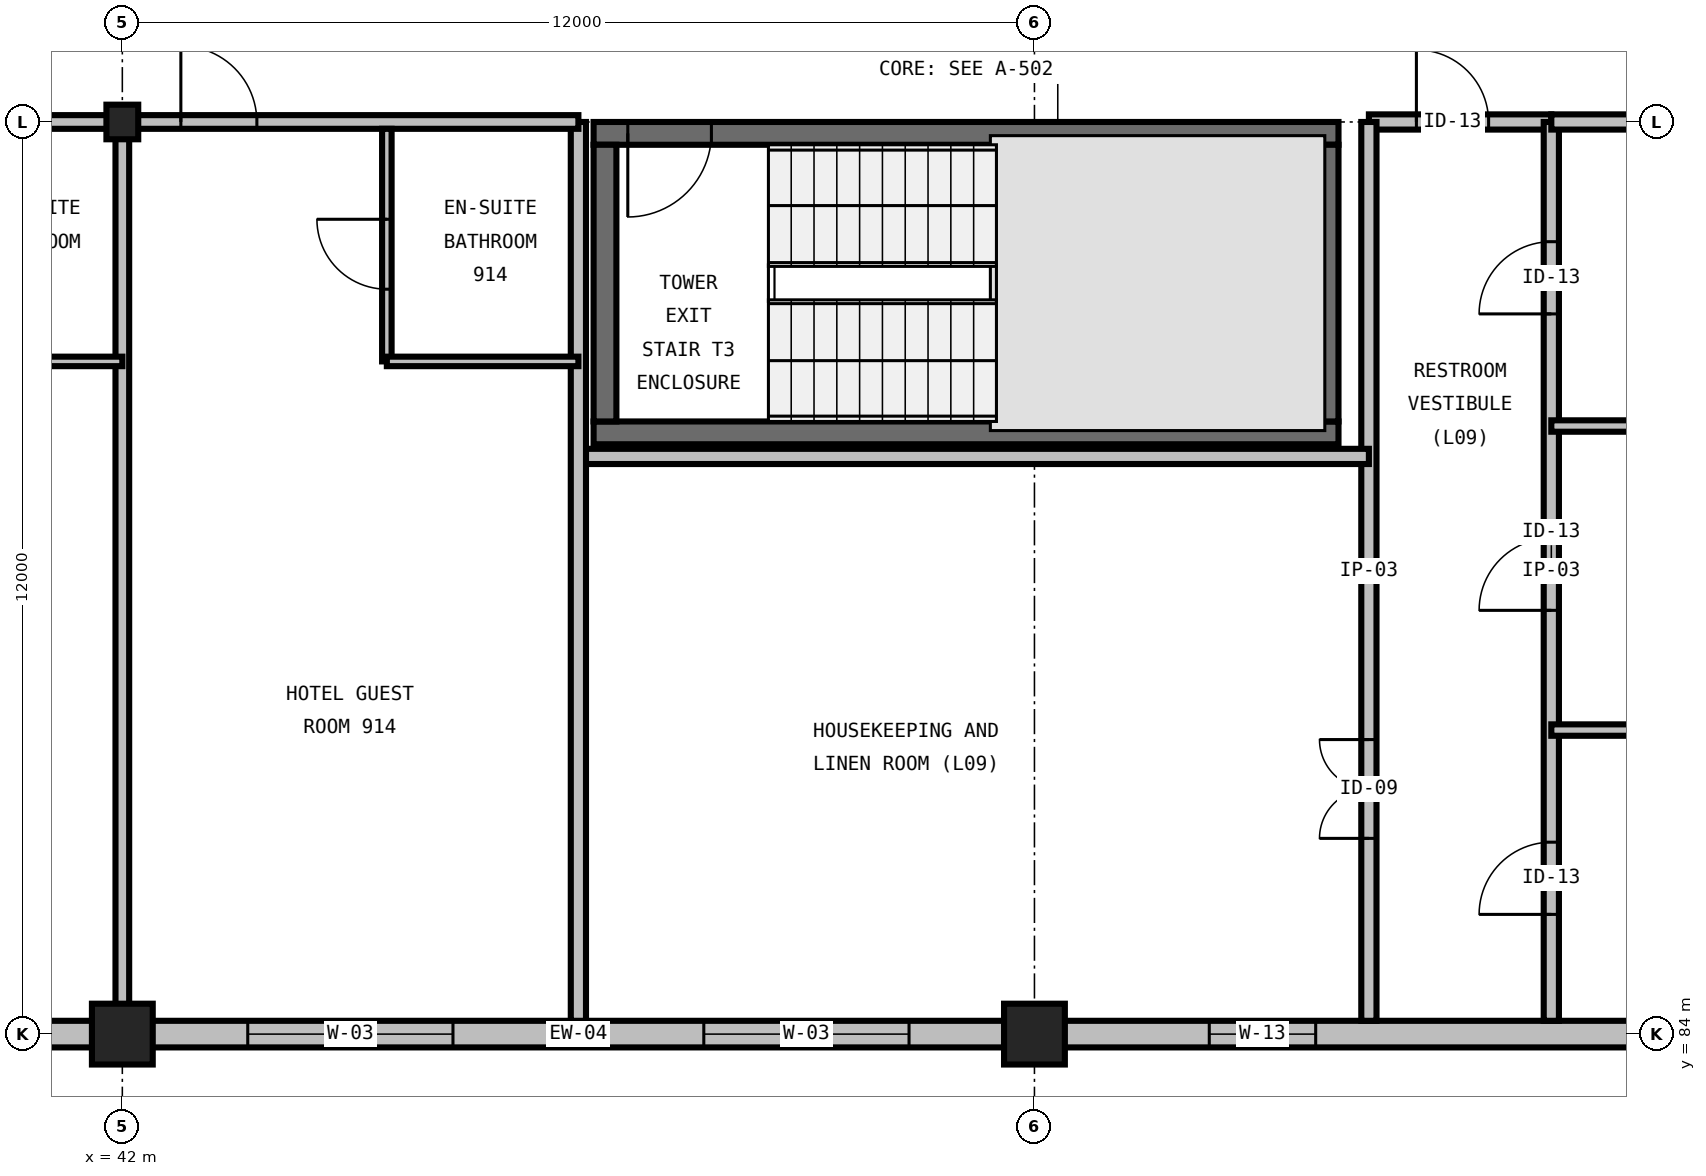
"""IFC4 building model, lengths in metres.
Left out: names, types, materials, properties, quantities, classifications, styles, units other than length and angle.
Written with IfcOpenShell. Run it as: python <this file> out.ifc"""

import sys

from ifc_helpers import new_model, si_unit, direction, frame, frame_2d, origin, origin_2d, place, context, subcontext, project, spatial, rectangle, i_section, extrude, element, fill, save


model = new_model("IFC4")
c1 = context("Model", 3, precision=1e-05, world=origin(), true_north=direction((0.0, 1.0)))
c2 = subcontext(c1, "Body", "Model", "MODEL_VIEW")
j1 = project(units=[si_unit("LENGTHUNIT", "METRE"), si_unit("PLANEANGLEUNIT", "RADIAN")], contexts=[c1])
p1 = place(None, origin())
s1 = spatial("IfcSite", under=j1, at=p1, CompositionType="ELEMENT")
p2 = place(p1, origin())
s2 = spatial("IfcBuilding", under=s1, at=p2, CompositionType="ELEMENT")
p3 = place(p2, frame((0.0, 0.0, 42.0)))
s3 = spatial("IfcBuildingStorey", under=s2, at=p3, CompositionType="ELEMENT", Elevation=42.0)
p4 = place(p3, frame((42.0, 84.0, 0.0), z_axis=(0.0, 0.0, 1.0), x_axis=(1.0, 0.0, 0.0)))
e1 = element("IfcColumn", 1, at=p4, inside=s3, PredefinedType="COLUMN", context=c2, shape_type="SweptSolid", body=[
    extrude(rectangle(XDim=0.8, YDim=0.8, at=origin_2d()), origin(), (0.0, 0.0, 1.0), 3.6),
])
p5 = place(p3, frame((42.0, 96.0, 0.0), z_axis=(0.0, 0.0, 1.0), x_axis=(1.0, 0.0, 0.0)))
e2 = element("IfcColumn", 2, at=p5, inside=s3, PredefinedType="COLUMN", context=c2, shape_type="SweptSolid", body=[
    extrude(i_section(OverallWidth=0.419, OverallDepth=0.455, WebThickness=0.042, FlangeThickness=0.068, FilletRadius=0.031, at=origin_2d()), origin(), (0.0, 0.0, 1.0), 3.6),
])
p6 = place(p3, frame((54.0, 84.0, 0.0), z_axis=(0.0, 0.0, 1.0), x_axis=(1.0, 0.0, 0.0)))
e3 = element("IfcColumn", 3, at=p6, inside=s3, PredefinedType="COLUMN", context=c2, shape_type="SweptSolid", body=[
    extrude(rectangle(XDim=0.8, YDim=0.8, at=origin_2d()), origin(), (0.0, 0.0, 1.0), 3.6),
])
p7 = place(p3, frame((48.2, 91.91, 0.0), z_axis=(0.0, 0.0, 1.0), x_axis=(1.0, 0.0, 0.0)))
e4 = element("IfcWall", 4, at=p7, inside=s3, PredefinedType="SHEAR", context=c2, shape_type="SweptSolid", body=[
    extrude(rectangle(XDim=9.8, YDim=0.3, at=frame_2d((4.9, 0.0))), origin(), (0.0, 0.0, 1.0), 3.6),
])
p8 = place(p3, frame((58.0, 95.85, 0.0), z_axis=(0.0, 0.0, 1.0), x_axis=(-1.0, 0.0, 0.0)))
e5 = element("IfcWall", 5, at=p8, inside=s3, PredefinedType="SHEAR", context=c2, shape_type="SweptSolid", body=[
    extrude(rectangle(XDim=9.8, YDim=0.3, at=frame_2d((4.9, 0.0))), origin(), (0.0, 0.0, 1.0), 3.6),
])
p9 = place(p8, frame((8.25, 0.0, 0.0)))
e6 = element("IfcOpeningElement", 6, at=p9, cuts=e5, PredefinedType="OPENING", context=c2, shape_type="SweptSolid", body=[
    extrude(rectangle(XDim=1.1, YDim=2.2, at=frame_2d((0.55, 1.1))), frame((0.0, 0.165, 0.0), z_axis=(0.0, -1.0, 0.0), x_axis=(1.0, 0.0, 0.0)), (0.0, 0.0, 1.0), 0.33),
])
for number, where, z_axis, x_axis in (
    (7, (48.35, 95.7, 0.0), (0.0, 0.0, 1.0), (0.0, -1.0, 0.0)),
    (8, (57.85, 92.06, 0.0), (0.0, 0.0, 1.0), (0.0, 1.0, 0.0)),
):
    element("IfcWall", number, at=place(p3, frame(where, z_axis=z_axis, x_axis=x_axis)), inside=s3, PredefinedType="SHEAR", context=c2, shape_type="SweptSolid", body=[
        extrude(rectangle(XDim=3.64, YDim=0.3, at=frame_2d((1.82, 0.0))), origin(), (0.0, 0.0, 1.0), 3.6),
    ])
p10 = place(p3, frame((36.0, 84.0, 0.0), z_axis=(0.0, 0.0, 1.0), x_axis=(1.0, 0.0, 0.0)))
e9 = element("IfcWall", 9, at=p10, inside=s3, PredefinedType="STANDARD", context=c2, shape_type="SweptSolid", body=[
    extrude(rectangle(XDim=6.0, YDim=0.35, at=frame_2d((3.0, 0.0))), origin(), (0.0, 0.0, 1.0), 2.486),
])
p11 = place(p10, frame((1.65, 0.0, 0.72)))
e10 = element("IfcOpeningElement", 10, at=p11, cuts=e9, PredefinedType="OPENING", context=c2, shape_type="SweptSolid", body=[
    extrude(rectangle(XDim=2.7, YDim=1.65, at=frame_2d((1.35, 0.825))), frame((0.0, 0.19, 0.0), z_axis=(0.0, -1.0, 0.0), x_axis=(1.0, 0.0, 0.0)), (0.0, 0.0, 1.0), 0.38),
])
p12 = place(p3, frame((42.0, 84.0, 0.0), z_axis=(0.0, 0.0, 1.0), x_axis=(1.0, 0.0, 0.0)))
e11 = element("IfcWall", 11, at=p12, inside=s3, PredefinedType="STANDARD", context=c2, shape_type="SweptSolid", body=[
    extrude(rectangle(XDim=12.0, YDim=0.35, at=frame_2d((6.0, 0.0))), origin(), (0.0, 0.0, 1.0), 2.486),
])
p13 = place(p12, frame((1.65, 0.0, 0.72)))
e12 = element("IfcOpeningElement", 12, at=p13, cuts=e11, PredefinedType="OPENING", context=c2, shape_type="SweptSolid", body=[
    extrude(rectangle(XDim=2.7, YDim=1.65, at=frame_2d((1.35, 0.825))), frame((0.0, 0.19, 0.0), z_axis=(0.0, -1.0, 0.0), x_axis=(1.0, 0.0, 0.0)), (0.0, 0.0, 1.0), 0.38),
])
p14 = place(p12, frame((7.65, 0.0, 0.72)))
e13 = element("IfcOpeningElement", 13, at=p14, cuts=e11, PredefinedType="OPENING", context=c2, shape_type="SweptSolid", body=[
    extrude(rectangle(XDim=2.7, YDim=1.65, at=frame_2d((1.35, 0.825))), frame((0.0, 0.19, 0.0), z_axis=(0.0, -1.0, 0.0), x_axis=(1.0, 0.0, 0.0)), (0.0, 0.0, 1.0), 0.38),
])
p15 = place(p3, frame((54.0, 84.0, 0.0), z_axis=(0.0, 0.0, 1.0), x_axis=(1.0, 0.0, 0.0)))
e14 = element("IfcWall", 14, at=p15, inside=s3, PredefinedType="STANDARD", context=c2, shape_type="SweptSolid", body=[
    extrude(rectangle(XDim=12.0, YDim=0.35, at=frame_2d((6.0, 0.0))), origin(), (0.0, 0.0, 1.0), 2.486),
])
p16 = place(p15, frame((2.3, 0.0, 1.0)))
e15 = element("IfcOpeningElement", 15, at=p16, cuts=e14, PredefinedType="OPENING", context=c2, shape_type="SweptSolid", body=[
    extrude(rectangle(XDim=1.4, YDim=1.4, at=frame_2d((0.7, 0.7))), frame((0.0, 0.19, 0.0), z_axis=(0.0, -1.0, 0.0), x_axis=(1.0, 0.0, 0.0)), (0.0, 0.0, 1.0), 0.38),
])
p17 = place(p15, frame((8.25, 0.0, 1.0)))
e16 = element("IfcOpeningElement", 16, at=p17, cuts=e14, PredefinedType="OPENING", context=c2, shape_type="SweptSolid", body=[
    extrude(rectangle(XDim=1.5, YDim=1.35, at=frame_2d((0.75, 0.675))), frame((0.0, 0.19, 0.0), z_axis=(0.0, -1.0, 0.0), x_axis=(1.0, 0.0, 0.0)), (0.0, 0.0, 1.0), 0.38),
])
p18 = place(p3, frame((58.4, 96.0, 0.0), z_axis=(0.0, 0.0, 1.0), x_axis=(1.0, 0.0, 0.0)))
e17 = element("IfcWall", 17, at=p18, inside=s3, PredefinedType="PARTITIONING", context=c2, shape_type="SweptSolid", body=[
    extrude(rectangle(XDim=2.4, YDim=0.2, at=frame_2d((1.2, 0.0))), origin(), (0.0, 0.0, 1.0), 2.359),
])
p19 = place(p18, frame((0.625, 0.0, 0.0)))
e18 = element("IfcOpeningElement", 18, at=p19, cuts=e17, PredefinedType="OPENING", context=c2, shape_type="SweptSolid", body=[
    extrude(rectangle(XDim=0.95, YDim=2.15, at=frame_2d((0.475, 1.075))), frame((0.0, 0.115, 0.0), z_axis=(0.0, -1.0, 0.0), x_axis=(1.0, 0.0, 0.0)), (0.0, 0.0, 1.0), 0.23),
])
p20 = place(p3, frame((58.4, 84.175, 0.0), z_axis=(0.0, 0.0, 1.0), x_axis=(0.0, 1.0, 0.0)))
e19 = element("IfcWall", 19, at=p20, inside=s3, PredefinedType="PARTITIONING", context=c2, shape_type="SweptSolid", body=[
    extrude(rectangle(XDim=11.825, YDim=0.2, at=frame_2d((5.913, 0.0))), origin(), (0.0, 0.0, 1.0), 3.29),
])
p21 = place(p20, frame((2.4, 0.0, 0.0)))
e20 = element("IfcOpeningElement", 20, at=p21, cuts=e19, PredefinedType="OPENING", context=c2, shape_type="SweptSolid", body=[
    extrude(rectangle(XDim=1.3, YDim=2.2, at=frame_2d((0.65, 1.1))), frame((0.0, 0.115, 0.0), z_axis=(0.0, -1.0, 0.0), x_axis=(1.0, 0.0, 0.0)), (0.0, 0.0, 1.0), 0.23),
])
p22 = place(p3, frame((60.8, 84.175, 0.0), z_axis=(0.0, 0.0, 1.0), x_axis=(0.0, 1.0, 0.0)))
e21 = element("IfcWall", 21, at=p22, inside=s3, PredefinedType="PARTITIONING", context=c2, shape_type="SweptSolid", body=[
    extrude(rectangle(XDim=11.825, YDim=0.2, at=frame_2d((5.913, 0.0))), origin(), (0.0, 0.0, 1.0), 3.29),
])
p23 = place(p22, frame((1.4, 0.0, 0.0)))
e22 = element("IfcOpeningElement", 22, at=p23, cuts=e21, PredefinedType="OPENING", context=c2, shape_type="SweptSolid", body=[
    extrude(rectangle(XDim=0.95, YDim=2.15, at=frame_2d((0.475, 1.075))), frame((0.0, 0.115, 0.0), z_axis=(0.0, -1.0, 0.0), x_axis=(1.0, 0.0, 0.0)), (0.0, 0.0, 1.0), 0.23),
])
p24 = place(p22, frame((5.4, 0.0, 0.0)))
e23 = element("IfcOpeningElement", 23, at=p24, cuts=e21, PredefinedType="OPENING", context=c2, shape_type="SweptSolid", body=[
    extrude(rectangle(XDim=0.95, YDim=2.15, at=frame_2d((0.475, 1.075))), frame((0.0, 0.115, 0.0), z_axis=(0.0, -1.0, 0.0), x_axis=(1.0, 0.0, 0.0)), (0.0, 0.0, 1.0), 0.23),
])
p25 = place(p22, frame((9.3, 0.0, 0.0)))
e24 = element("IfcOpeningElement", 24, at=p25, cuts=e21, PredefinedType="OPENING", context=c2, shape_type="SweptSolid", body=[
    extrude(rectangle(XDim=0.95, YDim=2.15, at=frame_2d((0.475, 1.075))), frame((0.0, 0.115, 0.0), z_axis=(0.0, -1.0, 0.0), x_axis=(1.0, 0.0, 0.0)), (0.0, 0.0, 1.0), 0.23),
])
p26 = place(p3, frame((60.8, 96.0, 0.0), z_axis=(0.0, 0.0, 1.0), x_axis=(1.0, 0.0, 0.0)))
e25 = element("IfcWall", 25, at=p26, inside=s3, PredefinedType="PARTITIONING", context=c2, shape_type="SweptSolid", body=[
    extrude(rectangle(XDim=5.2, YDim=0.2, at=frame_2d((2.6, 0.0))), origin(), (0.0, 0.0, 1.0), 2.359),
])
for number, where, z_axis, x_axis in (
    (26, (60.8, 88.0, 0.0), (0.0, 0.0, 1.0), (1.0, 0.0, 0.0)),
    (27, (60.8, 92.0, 0.0), (0.0, 0.0, 1.0), (1.0, 0.0, 0.0)),
):
    element("IfcWall", number, at=place(p3, frame(where, z_axis=z_axis, x_axis=x_axis)), inside=s3, PredefinedType="PARTITIONING", context=c2, shape_type="SweptSolid", body=[
        extrude(rectangle(XDim=5.2, YDim=0.15, at=frame_2d((2.6, 0.0))), origin(), (0.0, 0.0, 1.0), 3.29),
    ])
p27 = place(p3, frame((48.0, 91.6, 0.0), z_axis=(0.0, 0.0, 1.0), x_axis=(1.0, 0.0, 0.0)))
e28 = element("IfcWall", 28, at=p27, inside=s3, PredefinedType="PARTITIONING", context=c2, shape_type="SweptSolid", body=[
    extrude(rectangle(XDim=10.4, YDim=0.2, at=frame_2d((5.2, 0.0))), origin(), (0.0, 0.0, 1.0), 3.29),
])
p28 = place(p3, frame((48.0, 84.175, 0.0), z_axis=(0.0, 0.0, 1.0), x_axis=(0.0, 1.0, 0.0)))
e29 = element("IfcWall", 29, at=p28, inside=s3, PredefinedType="PARTITIONING", context=c2, shape_type="SweptSolid", body=[
    extrude(rectangle(XDim=11.825, YDim=0.2, at=frame_2d((5.913, 0.0))), origin(), (0.0, 0.0, 1.0), 3.29),
])
p29 = place(p3, frame((36.0, 96.0, 0.0), z_axis=(0.0, 0.0, 1.0), x_axis=(1.0, 0.0, 0.0)))
e30 = element("IfcWall", 30, at=p29, inside=s3, PredefinedType="PARTITIONING", context=c2, shape_type="SweptSolid", body=[
    extrude(rectangle(XDim=6.0, YDim=0.18, at=frame_2d((3.0, 0.0))), origin(), (0.0, 0.0, 1.0), 2.736),
])
p30 = place(p29, frame((0.77, 0.0, 0.0)))
e31 = element("IfcOpeningElement", 31, at=p30, cuts=e30, PredefinedType="OPENING", context=c2, shape_type="SweptSolid", body=[
    extrude(rectangle(XDim=1.0, YDim=2.15, at=frame_2d((0.5, 1.075))), frame((0.0, 0.105, 0.0), z_axis=(0.0, -1.0, 0.0), x_axis=(1.0, 0.0, 0.0)), (0.0, 0.0, 1.0), 0.21),
])
p31 = place(p3, frame((42.0, 84.175, 0.0), z_axis=(0.0, 0.0, 1.0), x_axis=(0.0, 1.0, 0.0)))
e32 = element("IfcWall", 32, at=p31, inside=s3, PredefinedType="PARTITIONING", context=c2, shape_type="SweptSolid", body=[
    extrude(rectangle(XDim=11.825, YDim=0.18, at=frame_2d((5.913, 0.0))), origin(), (0.0, 0.0, 1.0), 2.59),
])
p32 = place(p3, frame((39.48, 92.85, 0.0), z_axis=(0.0, 0.0, 1.0), x_axis=(1.0, 0.0, 0.0)))
e33 = element("IfcWall", 33, at=p32, inside=s3, PredefinedType="PARTITIONING", context=c2, shape_type="SweptSolid", body=[
    extrude(rectangle(XDim=2.52, YDim=0.125, at=frame_2d((1.26, 0.0))), origin(), (0.0, 0.0, 1.0), 3.29),
])
p33 = place(p3, frame((42.0, 96.0, 0.0), z_axis=(0.0, 0.0, 1.0), x_axis=(1.0, 0.0, 0.0)))
e34 = element("IfcWall", 34, at=p33, inside=s3, PredefinedType="PARTITIONING", context=c2, shape_type="SweptSolid", body=[
    extrude(rectangle(XDim=6.0, YDim=0.18, at=frame_2d((3.0, 0.0))), origin(), (0.0, 0.0, 1.0), 2.359),
])
p34 = place(p33, frame((0.77, 0.0, 0.0)))
e35 = element("IfcOpeningElement", 35, at=p34, cuts=e34, PredefinedType="OPENING", context=c2, shape_type="SweptSolid", body=[
    extrude(rectangle(XDim=1.0, YDim=2.15, at=frame_2d((0.5, 1.075))), frame((0.0, 0.105, 0.0), z_axis=(0.0, -1.0, 0.0), x_axis=(1.0, 0.0, 0.0)), (0.0, 0.0, 1.0), 0.21),
])
p35 = place(p3, frame((45.48, 92.85, 0.0), z_axis=(0.0, 0.0, 1.0), x_axis=(0.0, 1.0, 0.0)))
e36 = element("IfcWall", 36, at=p35, inside=s3, PredefinedType="PARTITIONING", context=c2, shape_type="SweptSolid", body=[
    extrude(rectangle(XDim=3.06, YDim=0.125, at=frame_2d((1.53, 0.0))), origin(), (0.0, 0.0, 1.0), 3.29),
])
p36 = place(p35, frame((0.95, 0.0, 0.0)))
e37 = element("IfcOpeningElement", 37, at=p36, cuts=e36, PredefinedType="OPENING", context=c2, shape_type="SweptSolid", body=[
    extrude(rectangle(XDim=0.92, YDim=2.1, at=frame_2d((0.46, 1.05))), frame((0.0, 0.077, 0.0), z_axis=(0.0, -1.0, 0.0), x_axis=(1.0, 0.0, 0.0)), (0.0, 0.0, 1.0), 0.155),
])
p37 = place(p3, frame((45.48, 92.85, 0.0), z_axis=(0.0, 0.0, 1.0), x_axis=(1.0, 0.0, 0.0)))
e38 = element("IfcWall", 38, at=p37, inside=s3, PredefinedType="PARTITIONING", context=c2, shape_type="SweptSolid", body=[
    extrude(rectangle(XDim=2.52, YDim=0.125, at=frame_2d((1.26, 0.0))), origin(), (0.0, 0.0, 1.0), 3.29),
])
p38 = place(p9, origin())
e39 = element("IfcDoor", 39, at=p38, inside=s3, OperationType="SINGLE_SWING_RIGHT", PredefinedType="DOOR", context=c2, shape_type="SweptSolid", body=[
    extrude(rectangle(XDim=1.1, YDim=2.2, at=frame_2d((0.55, 1.1))), frame((0.0, 0.025, 0.0), z_axis=(0.0, -1.0, 0.0), x_axis=(1.0, 0.0, 0.0)), (0.0, 0.0, 1.0), 0.05),
])
fill(e6, e39)
p39 = place(p13, origin())
e40 = element("IfcWindow", 40, at=p39, inside=s3, PartitioningType="TRIPLE_PANEL_VERTICAL", PredefinedType="WINDOW", context=c2, shape_type="SweptSolid", body=[
    extrude(rectangle(XDim=2.7, YDim=1.65, at=frame_2d((1.35, 0.825))), frame((0.0, 0.03, 0.0), z_axis=(0.0, -1.0, 0.0), x_axis=(1.0, 0.0, 0.0)), (0.0, 0.0, 1.0), 0.06),
])
fill(e12, e40)
p40 = place(p14, origin())
e41 = element("IfcWindow", 41, at=p40, inside=s3, PartitioningType="TRIPLE_PANEL_VERTICAL", PredefinedType="WINDOW", context=c2, shape_type="SweptSolid", body=[
    extrude(rectangle(XDim=2.7, YDim=1.65, at=frame_2d((1.35, 0.825))), frame((0.0, 0.03, 0.0), z_axis=(0.0, -1.0, 0.0), x_axis=(1.0, 0.0, 0.0)), (0.0, 0.0, 1.0), 0.06),
])
fill(e13, e41)
p41 = place(p16, origin())
e42 = element("IfcWindow", 42, at=p41, inside=s3, PartitioningType="SINGLE_PANEL", PredefinedType="WINDOW", context=c2, shape_type="SweptSolid", body=[
    extrude(rectangle(XDim=1.4, YDim=1.4, at=frame_2d((0.7, 0.7))), frame((0.0, 0.03, 0.0), z_axis=(0.0, -1.0, 0.0), x_axis=(1.0, 0.0, 0.0)), (0.0, 0.0, 1.0), 0.06),
])
fill(e15, e42)
p42 = place(p19, origin())
e43 = element("IfcDoor", 43, at=p42, inside=s3, OperationType="SINGLE_SWING_LEFT", PredefinedType="DOOR", context=c2, shape_type="SweptSolid", body=[
    extrude(rectangle(XDim=0.95, YDim=2.15, at=frame_2d((0.475, 1.075))), frame((0.0, 0.025, 0.0), z_axis=(0.0, -1.0, 0.0), x_axis=(1.0, 0.0, 0.0)), (0.0, 0.0, 1.0), 0.05),
])
fill(e18, e43)
p43 = place(p21, origin())
e44 = element("IfcDoor", 44, at=p43, inside=s3, OperationType="DOUBLE_DOOR_SINGLE_SWING", PredefinedType="DOOR", context=c2, shape_type="SweptSolid", body=[
    extrude(rectangle(XDim=1.3, YDim=2.2, at=frame_2d((0.65, 1.1))), frame((0.0, 0.025, 0.0), z_axis=(0.0, -1.0, 0.0), x_axis=(1.0, 0.0, 0.0)), (0.0, 0.0, 1.0), 0.05),
])
fill(e20, e44)
p44 = place(p23, origin())
e45 = element("IfcDoor", 45, at=p44, inside=s3, OperationType="SINGLE_SWING_LEFT", PredefinedType="DOOR", context=c2, shape_type="SweptSolid", body=[
    extrude(rectangle(XDim=0.95, YDim=2.15, at=frame_2d((0.475, 1.075))), frame((0.0, 0.025, 0.0), z_axis=(0.0, -1.0, 0.0), x_axis=(1.0, 0.0, 0.0)), (0.0, 0.0, 1.0), 0.05),
])
fill(e22, e45)
p45 = place(p24, origin())
e46 = element("IfcDoor", 46, at=p45, inside=s3, OperationType="SINGLE_SWING_LEFT", PredefinedType="DOOR", context=c2, shape_type="SweptSolid", body=[
    extrude(rectangle(XDim=0.95, YDim=2.15, at=frame_2d((0.475, 1.075))), frame((0.0, 0.025, 0.0), z_axis=(0.0, -1.0, 0.0), x_axis=(1.0, 0.0, 0.0)), (0.0, 0.0, 1.0), 0.05),
])
fill(e23, e46)
p46 = place(p25, origin())
e47 = element("IfcDoor", 47, at=p46, inside=s3, OperationType="SINGLE_SWING_LEFT", PredefinedType="DOOR", context=c2, shape_type="SweptSolid", body=[
    extrude(rectangle(XDim=0.95, YDim=2.15, at=frame_2d((0.475, 1.075))), frame((0.0, 0.025, 0.0), z_axis=(0.0, -1.0, 0.0), x_axis=(1.0, 0.0, 0.0)), (0.0, 0.0, 1.0), 0.05),
])
fill(e24, e47)
p47 = place(p34, origin())
e48 = element("IfcDoor", 48, at=p47, inside=s3, OperationType="SINGLE_SWING_LEFT", PredefinedType="DOOR", context=c2, shape_type="SweptSolid", body=[
    extrude(rectangle(XDim=1.0, YDim=2.15, at=frame_2d((0.5, 1.075))), frame((0.0, 0.025, 0.0), z_axis=(0.0, -1.0, 0.0), x_axis=(1.0, 0.0, 0.0)), (0.0, 0.0, 1.0), 0.05),
])
fill(e35, e48)
p48 = place(p36, origin())
e49 = element("IfcDoor", 49, at=p48, inside=s3, OperationType="SINGLE_SWING_RIGHT", PredefinedType="DOOR", context=c2, shape_type="SweptSolid", body=[
    extrude(rectangle(XDim=0.92, YDim=2.1, at=frame_2d((0.46, 1.05))), frame((0.0, 0.025, 0.0), z_axis=(0.0, -1.0, 0.0), x_axis=(1.0, 0.0, 0.0)), (0.0, 0.0, 1.0), 0.05),
])
fill(e37, e49)
save(model, sys.argv[1])
